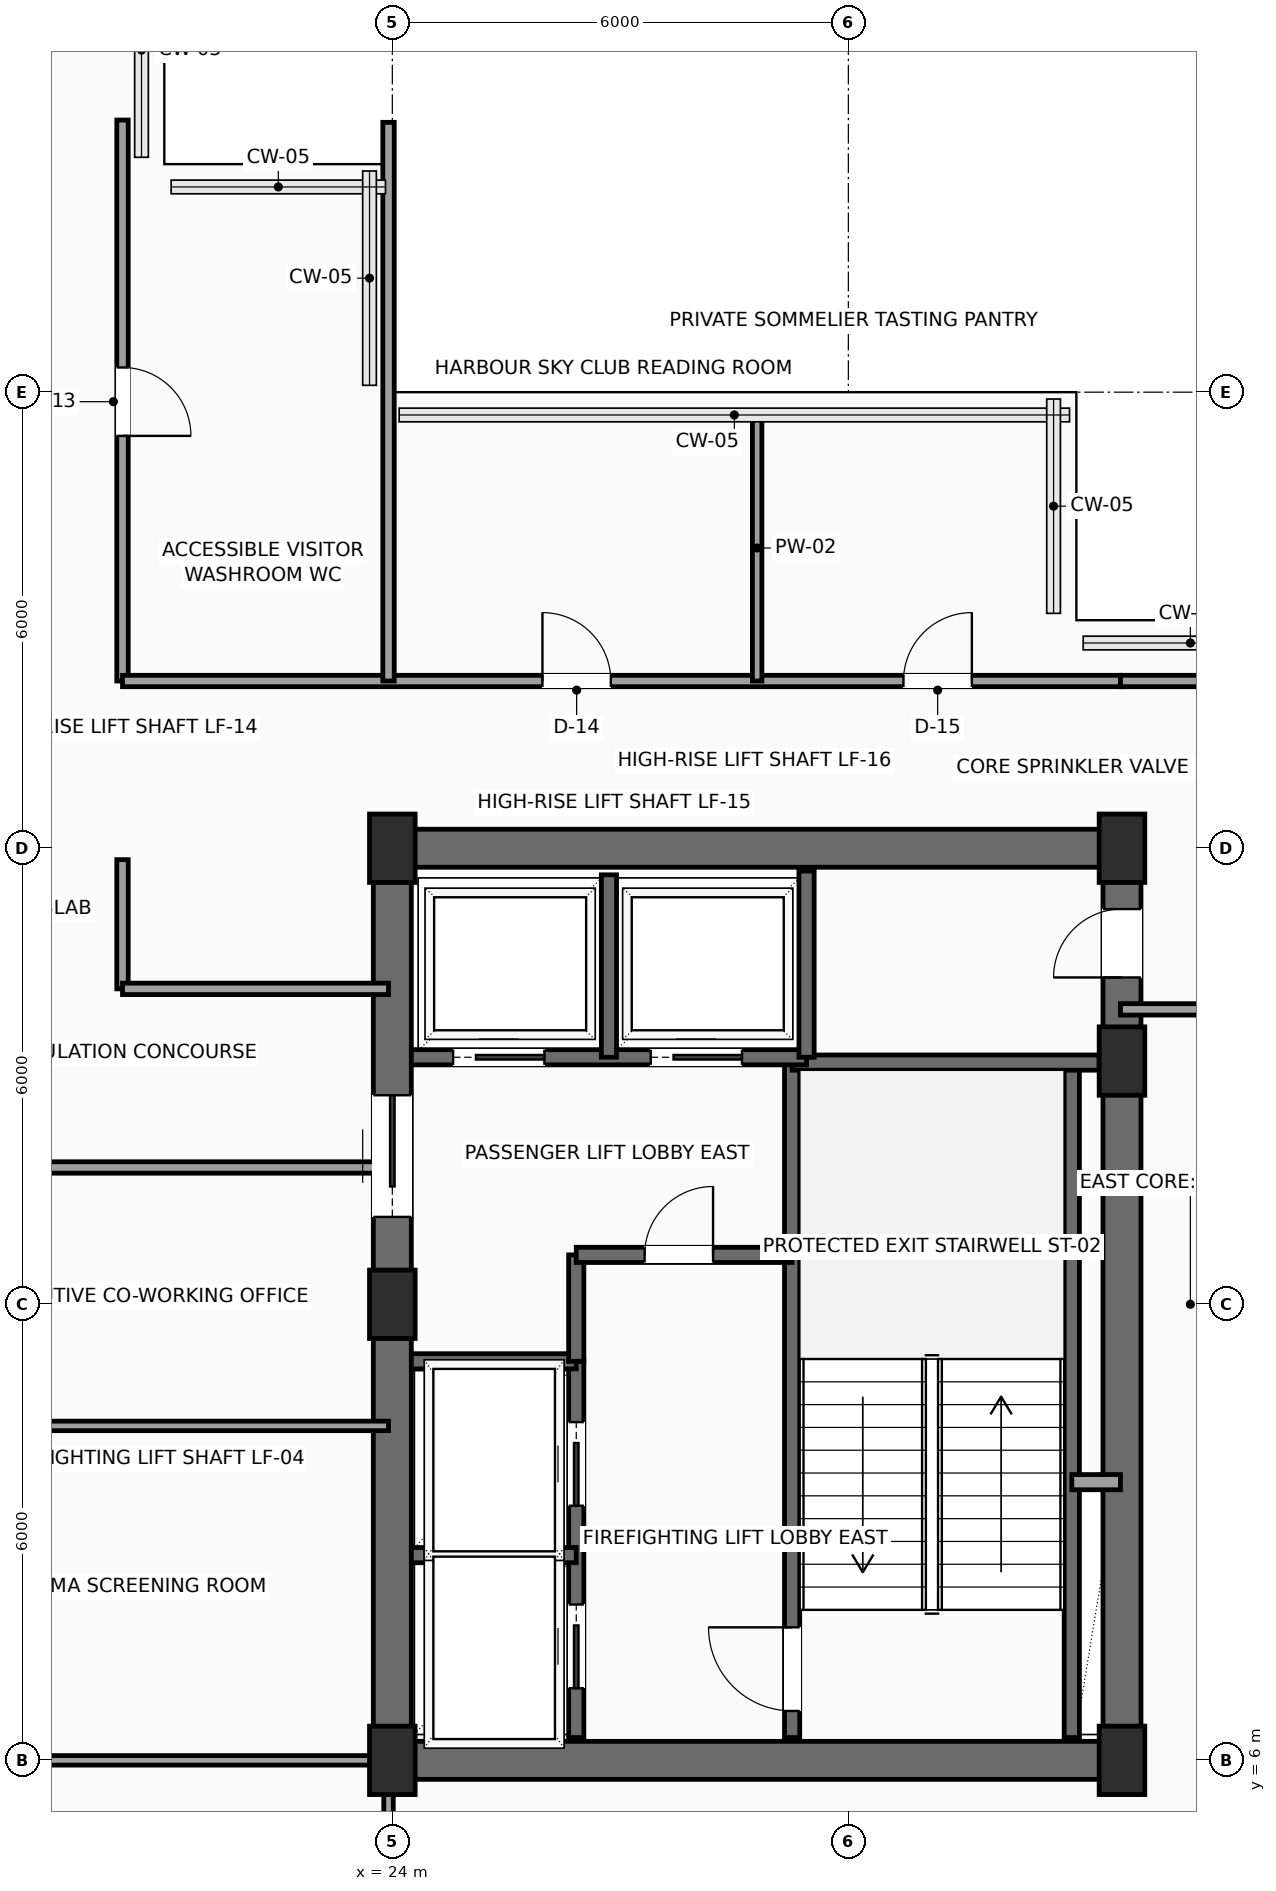
"""IFC4 building model, lengths in metres.
Left out: names, types, materials, properties, quantities, classifications, styles, units other than length and angle.
Written with IfcOpenShell. Run it as: python <this file> out.ifc"""

import sys

from ifc_helpers import new_model, si_unit, direction, frame, frame_2d, origin, origin_2d, place, context, subcontext, project, spatial, rectangle, extrude, element, fill, save


model = new_model("IFC4")
c1 = context("Model", 3, precision=1e-05, world=origin(), true_north=direction((0.0, 1.0)))
c2 = subcontext(c1, "Body", "Model", "MODEL_VIEW")
j1 = project(units=[si_unit("LENGTHUNIT", "METRE"), si_unit("PLANEANGLEUNIT", "RADIAN")], contexts=[c1])
p1 = place(None, origin())
s1 = spatial("IfcSite", under=j1, at=p1, CompositionType="ELEMENT")
p2 = place(p1, origin())
s2 = spatial("IfcBuilding", under=s1, at=p2, CompositionType="ELEMENT")
p3 = place(p2, frame((0.0, 0.0, 264.2)))
s3 = spatial("IfcBuildingStorey", under=s2, at=p3, CompositionType="ELEMENT", Elevation=264.2)
for number, where, z_axis, x_axis in (
    (1, (24.0, 6.0, 0.0), (0.0, 0.0, 1.0), (1.0, 0.0, 0.0)),
    (2, (24.0, 12.0, 0.0), (0.0, 0.0, 1.0), (1.0, 0.0, 0.0)),
    (3, (24.0, 18.0, 0.0), (0.0, 0.0, 1.0), (1.0, 0.0, 0.0)),
    (4, (33.6, 6.0, 0.0), (0.0, 0.0, 1.0), (1.0, 0.0, 0.0)),
    (5, (33.6, 15.2, 0.0), (0.0, 0.0, 1.0), (1.0, 0.0, 0.0)),
    (6, (33.6, 18.0, 0.0), (0.0, 0.0, 1.0), (1.0, 0.0, 0.0)),
):
    element("IfcColumn", number, at=place(p3, frame(where, z_axis=z_axis, x_axis=x_axis)), inside=s3, PredefinedType="COLUMN", context=c2, shape_type="SweptSolid", body=[
        extrude(rectangle(XDim=0.6, YDim=0.9, at=origin_2d()), origin(), (0.0, 0.0, 1.0), 3.5),
    ])
for number, where, z_axis, x_axis in (
    (7, (24.0, 6.0, 0.0), (0.0, 0.0, 1.0), (1.0, 0.0, 0.0)),
    (8, (24.0, 18.0, 0.0), (0.0, 0.0, 1.0), (1.0, 0.0, 0.0)),
):
    element("IfcWall", number, at=place(p3, frame(where, z_axis=z_axis, x_axis=x_axis)), inside=s3, PredefinedType="SHEAR", context=c2, shape_type="SweptSolid", body=[
        extrude(rectangle(XDim=9.6, YDim=0.5, at=frame_2d((4.8, 0.0))), origin(), (0.0, 0.0, 1.0), 3.3),
    ])
p4 = place(p3, frame((24.0, 6.0, 0.0), z_axis=(0.0, 0.0, 1.0), x_axis=(0.0, 1.0, 0.0)))
e9 = element("IfcWall", 9, at=p4, inside=s3, PredefinedType="SHEAR", context=c2, shape_type="SweptSolid", body=[
    extrude(rectangle(XDim=12.0, YDim=0.5, at=frame_2d((6.0, 0.0))), origin(), (0.0, 0.0, 1.0), 3.3),
])
p5 = place(p4, frame((7.15, 0.0, 0.0)))
e10 = element("IfcOpeningElement", 10, at=p5, cuts=e9, PredefinedType="OPENING", context=c2, shape_type="SweptSolid", body=[
    extrude(rectangle(XDim=1.6, YDim=2.3, at=frame_2d((0.8, 1.15))), frame((0.0, 0.26, 0.0), z_axis=(0.0, -1.0, 0.0), x_axis=(1.0, 0.0, 0.0)), (0.0, 0.0, 1.0), 0.52),
])
p6 = place(p3, frame((33.6, 6.0, 0.0), z_axis=(0.0, 0.0, 1.0), x_axis=(0.0, 1.0, 0.0)))
e11 = element("IfcWall", 11, at=p6, inside=s3, PredefinedType="SHEAR", context=c2, shape_type="SweptSolid", body=[
    extrude(rectangle(XDim=12.0, YDim=0.5, at=frame_2d((6.0, 0.0))), origin(), (0.0, 0.0, 1.0), 3.3),
])
p7 = place(p6, frame((10.3, 0.0, 0.0)))
e12 = element("IfcOpeningElement", 12, at=p7, cuts=e11, PredefinedType="OPENING", context=c2, shape_type="SweptSolid", body=[
    extrude(rectangle(XDim=0.9, YDim=2.15, at=frame_2d((0.45, 1.075))), frame((0.0, 0.26, 0.0), z_axis=(0.0, -1.0, 0.0), x_axis=(1.0, 0.0, 0.0)), (0.0, 0.0, 1.0), 0.52),
])
p8 = place(p3, frame((29.26, 6.3, 0.0), z_axis=(0.0, 0.0, 1.0), x_axis=(0.0, 1.0, 0.0)))
e13 = element("IfcWall", 13, at=p8, inside=s3, PredefinedType="SHEAR", context=c2, shape_type="SweptSolid", body=[
    extrude(rectangle(XDim=8.88, YDim=0.2, at=frame_2d((4.44, 0.0))), origin(), (0.0, 0.0, 1.0), 3.3),
])
p9 = place(p8, frame((0.35, 0.0, 0.0)))
e14 = element("IfcOpeningElement", 14, at=p9, cuts=e13, PredefinedType="OPENING", context=c2, shape_type="SweptSolid", body=[
    extrude(rectangle(XDim=1.1, YDim=2.2, at=frame_2d((0.55, 1.1))), frame((0.0, 0.11, 0.0), z_axis=(0.0, -1.0, 0.0), x_axis=(1.0, 0.0, 0.0)), (0.0, 0.0, 1.0), 0.22),
])
p10 = place(p3, frame((32.94, 6.3, 0.0), z_axis=(0.0, 0.0, 1.0), x_axis=(0.0, 1.0, 0.0)))
e15 = element("IfcWall", 15, at=p10, inside=s3, PredefinedType="SHEAR", context=c2, shape_type="SweptSolid", body=[
    extrude(rectangle(XDim=8.88, YDim=0.2, at=frame_2d((4.44, 0.0))), origin(), (0.0, 0.0, 1.0), 3.3),
])
p11 = place(p3, frame((29.26, 15.18, 0.0), z_axis=(0.0, 0.0, 1.0), x_axis=(1.0, 0.0, 0.0)))
e16 = element("IfcWall", 16, at=p11, inside=s3, PredefinedType="SHEAR", context=c2, shape_type="SweptSolid", body=[
    extrude(rectangle(XDim=4.04, YDim=0.2, at=frame_2d((2.02, 0.0))), origin(), (0.0, 0.0, 1.0), 3.3),
])
p12 = place(p3, frame((26.42, 6.3, 0.0), z_axis=(0.0, 0.0, 1.0), x_axis=(0.0, 1.0, 0.0)))
e17 = element("IfcWall", 17, at=p12, inside=s3, PredefinedType="SHEAR", context=c2, shape_type="SweptSolid", body=[
    extrude(rectangle(XDim=4.95, YDim=0.2, at=frame_2d((2.475, 0.0))), origin(), (0.0, 0.0, 1.0), 3.3),
])
p13 = place(p12, frame((0.65, 0.0, 0.0)))
e18 = element("IfcOpeningElement", 18, at=p13, cuts=e17, PredefinedType="OPENING", context=c2, shape_type="SweptSolid", body=[
    extrude(rectangle(XDim=1.1, YDim=2.2, at=frame_2d((0.55, 1.1))), frame((0.0, 0.11, 0.0), z_axis=(0.0, -1.0, 0.0), x_axis=(1.0, 0.0, 0.0)), (0.0, 0.0, 1.0), 0.22),
])
p14 = place(p12, frame((3.05, 0.0, 0.0)))
e19 = element("IfcOpeningElement", 19, at=p14, cuts=e17, PredefinedType="OPENING", context=c2, shape_type="SweptSolid", body=[
    extrude(rectangle(XDim=1.1, YDim=2.2, at=frame_2d((0.55, 1.1))), frame((0.0, 0.11, 0.0), z_axis=(0.0, -1.0, 0.0), x_axis=(1.0, 0.0, 0.0)), (0.0, 0.0, 1.0), 0.22),
])
for number, where, z_axis, x_axis in (
    (20, (24.25, 8.7, 0.0), (0.0, 0.0, 1.0), (1.0, 0.0, 0.0)),
    (21, (24.25, 11.25, 0.0), (0.0, 0.0, 1.0), (1.0, 0.0, 0.0)),
):
    element("IfcWall", number, at=place(p3, frame(where, z_axis=z_axis, x_axis=x_axis)), inside=s3, PredefinedType="SHEAR", context=c2, shape_type="SweptSolid", body=[
        extrude(rectangle(XDim=2.17, YDim=0.2, at=frame_2d((1.085, 0.0))), origin(), (0.0, 0.0, 1.0), 3.3),
    ])
p15 = place(p3, frame((26.42, 11.25, 0.0), z_axis=(0.0, 0.0, 1.0), x_axis=(0.0, 1.0, 0.0)))
e22 = element("IfcWall", 22, at=p15, inside=s3, PredefinedType="SHEAR", context=c2, shape_type="SweptSolid", body=[
    extrude(rectangle(XDim=1.4, YDim=0.2, at=frame_2d((0.7, 0.0))), origin(), (0.0, 0.0, 1.0), 3.3),
])
p16 = place(p3, frame((26.42, 12.65, 0.0), z_axis=(0.0, 0.0, 1.0), x_axis=(1.0, 0.0, 0.0)))
e23 = element("IfcWall", 23, at=p16, inside=s3, PredefinedType="SHEAR", context=c2, shape_type="SweptSolid", body=[
    extrude(rectangle(XDim=2.84, YDim=0.2, at=frame_2d((1.42, 0.0))), origin(), (0.0, 0.0, 1.0), 3.3),
])
p17 = place(p16, frame((0.9, 0.0, 0.0)))
e24 = element("IfcOpeningElement", 24, at=p17, cuts=e23, PredefinedType="OPENING", context=c2, shape_type="SweptSolid", body=[
    extrude(rectangle(XDim=0.9, YDim=2.15, at=frame_2d((0.45, 1.075))), frame((0.0, 0.11, 0.0), z_axis=(0.0, -1.0, 0.0), x_axis=(1.0, 0.0, 0.0)), (0.0, 0.0, 1.0), 0.22),
])
p18 = place(p3, frame((32.94, 9.66, 0.0), z_axis=(0.0, 0.0, 1.0), x_axis=(1.0, 0.0, 0.0)))
e25 = element("IfcWall", 25, at=p18, inside=s3, PredefinedType="SOLIDWALL", context=c2, shape_type="SweptSolid", body=[
    extrude(rectangle(XDim=0.64, YDim=0.2, at=frame_2d((0.32, 0.0))), origin(), (0.0, 0.0, 1.0), 3.3),
])
p19 = place(p3, frame((24.25, 15.25, 0.0), z_axis=(0.0, 0.0, 1.0), x_axis=(1.0, 0.0, 0.0)))
e26 = element("IfcWall", 26, at=p19, inside=s3, PredefinedType="SHEAR", context=c2, shape_type="SweptSolid", body=[
    extrude(rectangle(XDim=5.2, YDim=0.2, at=frame_2d((2.6, 0.0))), origin(), (0.0, 0.0, 1.0), 3.3),
])
p20 = place(p19, frame((0.55, 0.0, 0.0)))
e27 = element("IfcOpeningElement", 27, at=p20, cuts=e26, PredefinedType="OPENING", context=c2, shape_type="SweptSolid", body=[
    extrude(rectangle(XDim=1.2, YDim=2.2, at=frame_2d((0.6, 1.1))), frame((0.0, 0.11, 0.0), z_axis=(0.0, -1.0, 0.0), x_axis=(1.0, 0.0, 0.0)), (0.0, 0.0, 1.0), 0.22),
])
p21 = place(p19, frame((3.15, 0.0, 0.0)))
e28 = element("IfcOpeningElement", 28, at=p21, cuts=e26, PredefinedType="OPENING", context=c2, shape_type="SweptSolid", body=[
    extrude(rectangle(XDim=1.2, YDim=2.2, at=frame_2d((0.6, 1.1))), frame((0.0, 0.11, 0.0), z_axis=(0.0, -1.0, 0.0), x_axis=(1.0, 0.0, 0.0)), (0.0, 0.0, 1.0), 0.22),
])
p22 = place(p3, frame((26.85, 15.25, 0.0), z_axis=(0.0, 0.0, 1.0), x_axis=(0.0, 1.0, 0.0)))
e29 = element("IfcWall", 29, at=p22, inside=s3, PredefinedType="SHEAR", context=c2, shape_type="SweptSolid", body=[
    extrude(rectangle(XDim=2.4, YDim=0.2, at=frame_2d((1.2, 0.0))), origin(), (0.0, 0.0, 1.0), 3.3),
])
p23 = place(p3, frame((29.45, 15.25, 0.0), z_axis=(0.0, 0.0, 1.0), x_axis=(0.0, 1.0, 0.0)))
e30 = element("IfcWall", 30, at=p23, inside=s3, PredefinedType="SHEAR", context=c2, shape_type="SweptSolid", body=[
    extrude(rectangle(XDim=2.45, YDim=0.2, at=frame_2d((1.225, 0.0))), origin(), (0.0, 0.0, 1.0), 3.3),
])
p24 = place(p3, frame((20.45, 27.58, 0.0), z_axis=(0.0, 0.0, 1.0), x_axis=(0.0, -1.0, 0.0)))
e31 = element("IfcWall", 31, at=p24, inside=s3, PredefinedType="PARTITIONING", context=c2, shape_type="SweptSolid", body=[
    extrude(rectangle(XDim=7.38, YDim=0.15, at=frame_2d((3.69, 0.0))), origin(), (0.0, 0.0, 1.0), 3.3),
])
p25 = place(p24, frame((3.255, 0.0, 0.0)))
e32 = element("IfcOpeningElement", 32, at=p25, cuts=e31, PredefinedType="OPENING", context=c2, shape_type="SweptSolid", body=[
    extrude(rectangle(XDim=0.9, YDim=2.1, at=frame_2d((0.45, 1.05))), frame((0.0, 0.085, 0.0), z_axis=(0.0, -1.0, 0.0), x_axis=(1.0, 0.0, 0.0)), (0.0, 0.0, 1.0), 0.17),
])
p26 = place(p3, frame((20.45, 20.2, 0.0), z_axis=(0.0, 0.0, 1.0), x_axis=(1.0, 0.0, 0.0)))
e33 = element("IfcWall", 33, at=p26, inside=s3, PredefinedType="PARTITIONING", context=c2, shape_type="SweptSolid", body=[
    extrude(rectangle(XDim=13.13, YDim=0.15, at=frame_2d((6.565, 0.0))), origin(), (0.0, 0.0, 1.0), 3.3),
])
p27 = place(p26, frame((5.525, 0.0, 0.0)))
e34 = element("IfcOpeningElement", 34, at=p27, cuts=e33, PredefinedType="OPENING", context=c2, shape_type="SweptSolid", body=[
    extrude(rectangle(XDim=0.9, YDim=2.1, at=frame_2d((0.45, 1.05))), frame((0.0, 0.085, 0.0), z_axis=(0.0, -1.0, 0.0), x_axis=(1.0, 0.0, 0.0)), (0.0, 0.0, 1.0), 0.17),
])
p28 = place(p26, frame((10.275, 0.0, 0.0)))
e35 = element("IfcOpeningElement", 35, at=p28, cuts=e33, PredefinedType="OPENING", context=c2, shape_type="SweptSolid", body=[
    extrude(rectangle(XDim=0.9, YDim=2.1, at=frame_2d((0.45, 1.05))), frame((0.0, 0.085, 0.0), z_axis=(0.0, -1.0, 0.0), x_axis=(1.0, 0.0, 0.0)), (0.0, 0.0, 1.0), 0.17),
])
for number, where, z_axis, x_axis in (
    (36, (33.58, 20.2, 0.0), (0.0, 0.0, 1.0), (1.0, 0.0, 0.0)),
    (37, (35.7, 15.88, 0.0), (0.0, 0.0, 1.0), (-1.0, 0.0, 0.0)),
):
    element("IfcWall", number, at=place(p3, frame(where, z_axis=z_axis, x_axis=x_axis)), inside=s3, PredefinedType="PARTITIONING", context=c2, shape_type="SweptSolid", body=[
        extrude(rectangle(XDim=2.12, YDim=0.15, at=frame_2d((1.06, 0.0))), origin(), (0.0, 0.0, 1.0), 3.3),
    ])
p29 = place(p3, frame((20.45, 17.85, 0.0), z_axis=(0.0, 0.0, 1.0), x_axis=(0.0, -1.0, 0.0)))
e38 = element("IfcWall", 38, at=p29, inside=s3, PredefinedType="PARTITIONING", context=c2, shape_type="SweptSolid", body=[
    extrude(rectangle(XDim=1.7, YDim=0.15, at=frame_2d((0.85, 0.0))), origin(), (0.0, 0.0, 1.0), 3.3),
])
p30 = place(p3, frame((20.45, 16.15, 0.0), z_axis=(0.0, 0.0, 1.0), x_axis=(1.0, 0.0, 0.0)))
e39 = element("IfcWall", 39, at=p30, inside=s3, PredefinedType="PARTITIONING", context=c2, shape_type="SweptSolid", body=[
    extrude(rectangle(XDim=3.5, YDim=0.15, at=frame_2d((1.75, 0.0))), origin(), (0.0, 0.0, 1.0), 3.3),
])
p31 = place(p3, frame((23.95, 13.8, 0.0), z_axis=(0.0, 0.0, 1.0), x_axis=(-1.0, 0.0, 0.0)))
e40 = element("IfcWall", 40, at=p31, inside=s3, PredefinedType="PARTITIONING", context=c2, shape_type="SweptSolid", body=[
    extrude(rectangle(XDim=9.0, YDim=0.15, at=frame_2d((4.5, 0.0))), origin(), (0.0, 0.0, 1.0), 3.3),
])
p32 = place(p3, frame((23.95, 20.2, 0.0), z_axis=(0.0, 0.0, 1.0), x_axis=(0.0, 1.0, 0.0)))
e41 = element("IfcWall", 41, at=p32, inside=s3, PredefinedType="PARTITIONING", context=c2, shape_type="SweptSolid", body=[
    extrude(rectangle(XDim=7.35, YDim=0.15, at=frame_2d((3.675, 0.0))), origin(), (0.0, 0.0, 1.0), 3.3),
])
p33 = place(p3, frame((28.8, 20.2, 0.0), z_axis=(0.0, 0.0, 1.0), x_axis=(0.0, 1.0, 0.0)))
e42 = element("IfcWall", 42, at=p33, inside=s3, PredefinedType="PARTITIONING", context=c2, shape_type="SweptSolid", body=[
    extrude(rectangle(XDim=3.5, YDim=0.125, at=frame_2d((1.75, 0.0))), origin(), (0.0, 0.0, 1.0), 3.3),
])
p34 = place(p3, frame((14.95, 6.0, 0.0), z_axis=(0.0, 0.0, 1.0), x_axis=(1.0, 0.0, 0.0)))
e43 = element("IfcWall", 43, at=p34, inside=s3, PredefinedType="PARTITIONING", context=c2, shape_type="SweptSolid", body=[
    extrude(rectangle(XDim=9.0, YDim=0.125, at=frame_2d((4.5, 0.0))), origin(), (0.0, 0.0, 1.0), 2.992),
])
p35 = place(p3, frame((23.95, 0.3, 0.0), z_axis=(0.0, 0.0, 1.0), x_axis=(0.0, 1.0, 0.0)))
e44 = element("IfcWall", 44, at=p35, inside=s3, PredefinedType="PARTITIONING", context=c2, shape_type="SweptSolid", body=[
    extrude(rectangle(XDim=5.7, YDim=0.125, at=frame_2d((2.85, 0.0))), origin(), (0.0, 0.0, 1.0), 2.992),
])
p36 = place(p3, frame((14.95, 10.4, 0.0), z_axis=(0.0, 0.0, 1.0), x_axis=(1.0, 0.0, 0.0)))
e45 = element("IfcWall", 45, at=p36, inside=s3, PredefinedType="PARTITIONING", context=c2, shape_type="SweptSolid", body=[
    extrude(rectangle(XDim=9.0, YDim=0.125, at=frame_2d((4.5, 0.0))), origin(), (0.0, 0.0, 1.0), 3.3),
])
p37 = place(p5, origin())
e46 = element("IfcDoor", 46, at=p37, inside=s3, OperationType="DOUBLE_DOOR_SLIDING", PredefinedType="DOOR", context=c2, shape_type="SweptSolid", body=[
    extrude(rectangle(XDim=1.6, YDim=2.3, at=frame_2d((0.8, 1.15))), frame((0.0, 0.025, 0.0), z_axis=(0.0, -1.0, 0.0), x_axis=(1.0, 0.0, 0.0)), (0.0, 0.0, 1.0), 0.05),
])
fill(e10, e46)
p38 = place(p7, origin())
e47 = element("IfcDoor", 47, at=p38, inside=s3, OperationType="SINGLE_SWING_LEFT", PredefinedType="DOOR", context=c2, shape_type="SweptSolid", body=[
    extrude(rectangle(XDim=0.9, YDim=2.15, at=frame_2d((0.45, 1.075))), frame((0.0, 0.025, 0.0), z_axis=(0.0, -1.0, 0.0), x_axis=(1.0, 0.0, 0.0)), (0.0, 0.0, 1.0), 0.05),
])
fill(e12, e47)
p39 = place(p9, origin())
e48 = element("IfcDoor", 48, at=p39, inside=s3, OperationType="SINGLE_SWING_RIGHT", PredefinedType="DOOR", context=c2, shape_type="SweptSolid", body=[
    extrude(rectangle(XDim=1.1, YDim=2.2, at=frame_2d((0.55, 1.1))), frame((0.0, 0.025, 0.0), z_axis=(0.0, -1.0, 0.0), x_axis=(1.0, 0.0, 0.0)), (0.0, 0.0, 1.0), 0.05),
])
fill(e14, e48)
p40 = place(p13, origin())
e49 = element("IfcDoor", 49, at=p40, inside=s3, OperationType="SLIDING_TO_LEFT", PredefinedType="DOOR", context=c2, shape_type="SweptSolid", body=[
    extrude(rectangle(XDim=1.1, YDim=2.2, at=frame_2d((0.55, 1.1))), frame((0.0, 0.025, 0.0), z_axis=(0.0, -1.0, 0.0), x_axis=(1.0, 0.0, 0.0)), (0.0, 0.0, 1.0), 0.05),
])
fill(e18, e49)
p41 = place(p14, origin())
e50 = element("IfcDoor", 50, at=p41, inside=s3, OperationType="SLIDING_TO_LEFT", PredefinedType="DOOR", context=c2, shape_type="SweptSolid", body=[
    extrude(rectangle(XDim=1.1, YDim=2.2, at=frame_2d((0.55, 1.1))), frame((0.0, 0.025, 0.0), z_axis=(0.0, -1.0, 0.0), x_axis=(1.0, 0.0, 0.0)), (0.0, 0.0, 1.0), 0.05),
])
fill(e19, e50)
p42 = place(p17, origin())
e51 = element("IfcDoor", 51, at=p42, inside=s3, OperationType="SINGLE_SWING_RIGHT", PredefinedType="DOOR", context=c2, shape_type="SweptSolid", body=[
    extrude(rectangle(XDim=0.9, YDim=2.15, at=frame_2d((0.45, 1.075))), frame((0.0, 0.025, 0.0), z_axis=(0.0, -1.0, 0.0), x_axis=(1.0, 0.0, 0.0)), (0.0, 0.0, 1.0), 0.05),
])
fill(e24, e51)
p43 = place(p20, origin())
e52 = element("IfcDoor", 52, at=p43, inside=s3, OperationType="SLIDING_TO_RIGHT", PredefinedType="DOOR", context=c2, shape_type="SweptSolid", body=[
    extrude(rectangle(XDim=1.2, YDim=2.2, at=frame_2d((0.6, 1.1))), frame((0.0, 0.025, 0.0), z_axis=(0.0, -1.0, 0.0), x_axis=(1.0, 0.0, 0.0)), (0.0, 0.0, 1.0), 0.05),
])
fill(e27, e52)
p44 = place(p21, origin())
e53 = element("IfcDoor", 53, at=p44, inside=s3, OperationType="SLIDING_TO_RIGHT", PredefinedType="DOOR", context=c2, shape_type="SweptSolid", body=[
    extrude(rectangle(XDim=1.2, YDim=2.2, at=frame_2d((0.6, 1.1))), frame((0.0, 0.025, 0.0), z_axis=(0.0, -1.0, 0.0), x_axis=(1.0, 0.0, 0.0)), (0.0, 0.0, 1.0), 0.05),
])
fill(e28, e53)
p45 = place(p25, origin())
e54 = element("IfcDoor", 54, at=p45, inside=s3, OperationType="SINGLE_SWING_RIGHT", PredefinedType="DOOR", context=c2, shape_type="SweptSolid", body=[
    extrude(rectangle(XDim=0.9, YDim=2.1, at=frame_2d((0.45, 1.05))), frame((0.0, 0.025, 0.0), z_axis=(0.0, -1.0, 0.0), x_axis=(1.0, 0.0, 0.0)), (0.0, 0.0, 1.0), 0.05),
])
fill(e32, e54)
p46 = place(p27, origin())
e55 = element("IfcDoor", 55, at=p46, inside=s3, OperationType="SINGLE_SWING_LEFT", PredefinedType="DOOR", context=c2, shape_type="SweptSolid", body=[
    extrude(rectangle(XDim=0.9, YDim=2.1, at=frame_2d((0.45, 1.05))), frame((0.0, 0.025, 0.0), z_axis=(0.0, -1.0, 0.0), x_axis=(1.0, 0.0, 0.0)), (0.0, 0.0, 1.0), 0.05),
])
fill(e34, e55)
p47 = place(p28, origin())
e56 = element("IfcDoor", 56, at=p47, inside=s3, OperationType="SINGLE_SWING_RIGHT", PredefinedType="DOOR", context=c2, shape_type="SweptSolid", body=[
    extrude(rectangle(XDim=0.9, YDim=2.1, at=frame_2d((0.45, 1.05))), frame((0.0, 0.025, 0.0), z_axis=(0.0, -1.0, 0.0), x_axis=(1.0, 0.0, 0.0)), (0.0, 0.0, 1.0), 0.05),
])
fill(e35, e56)
save(model, sys.argv[1])
